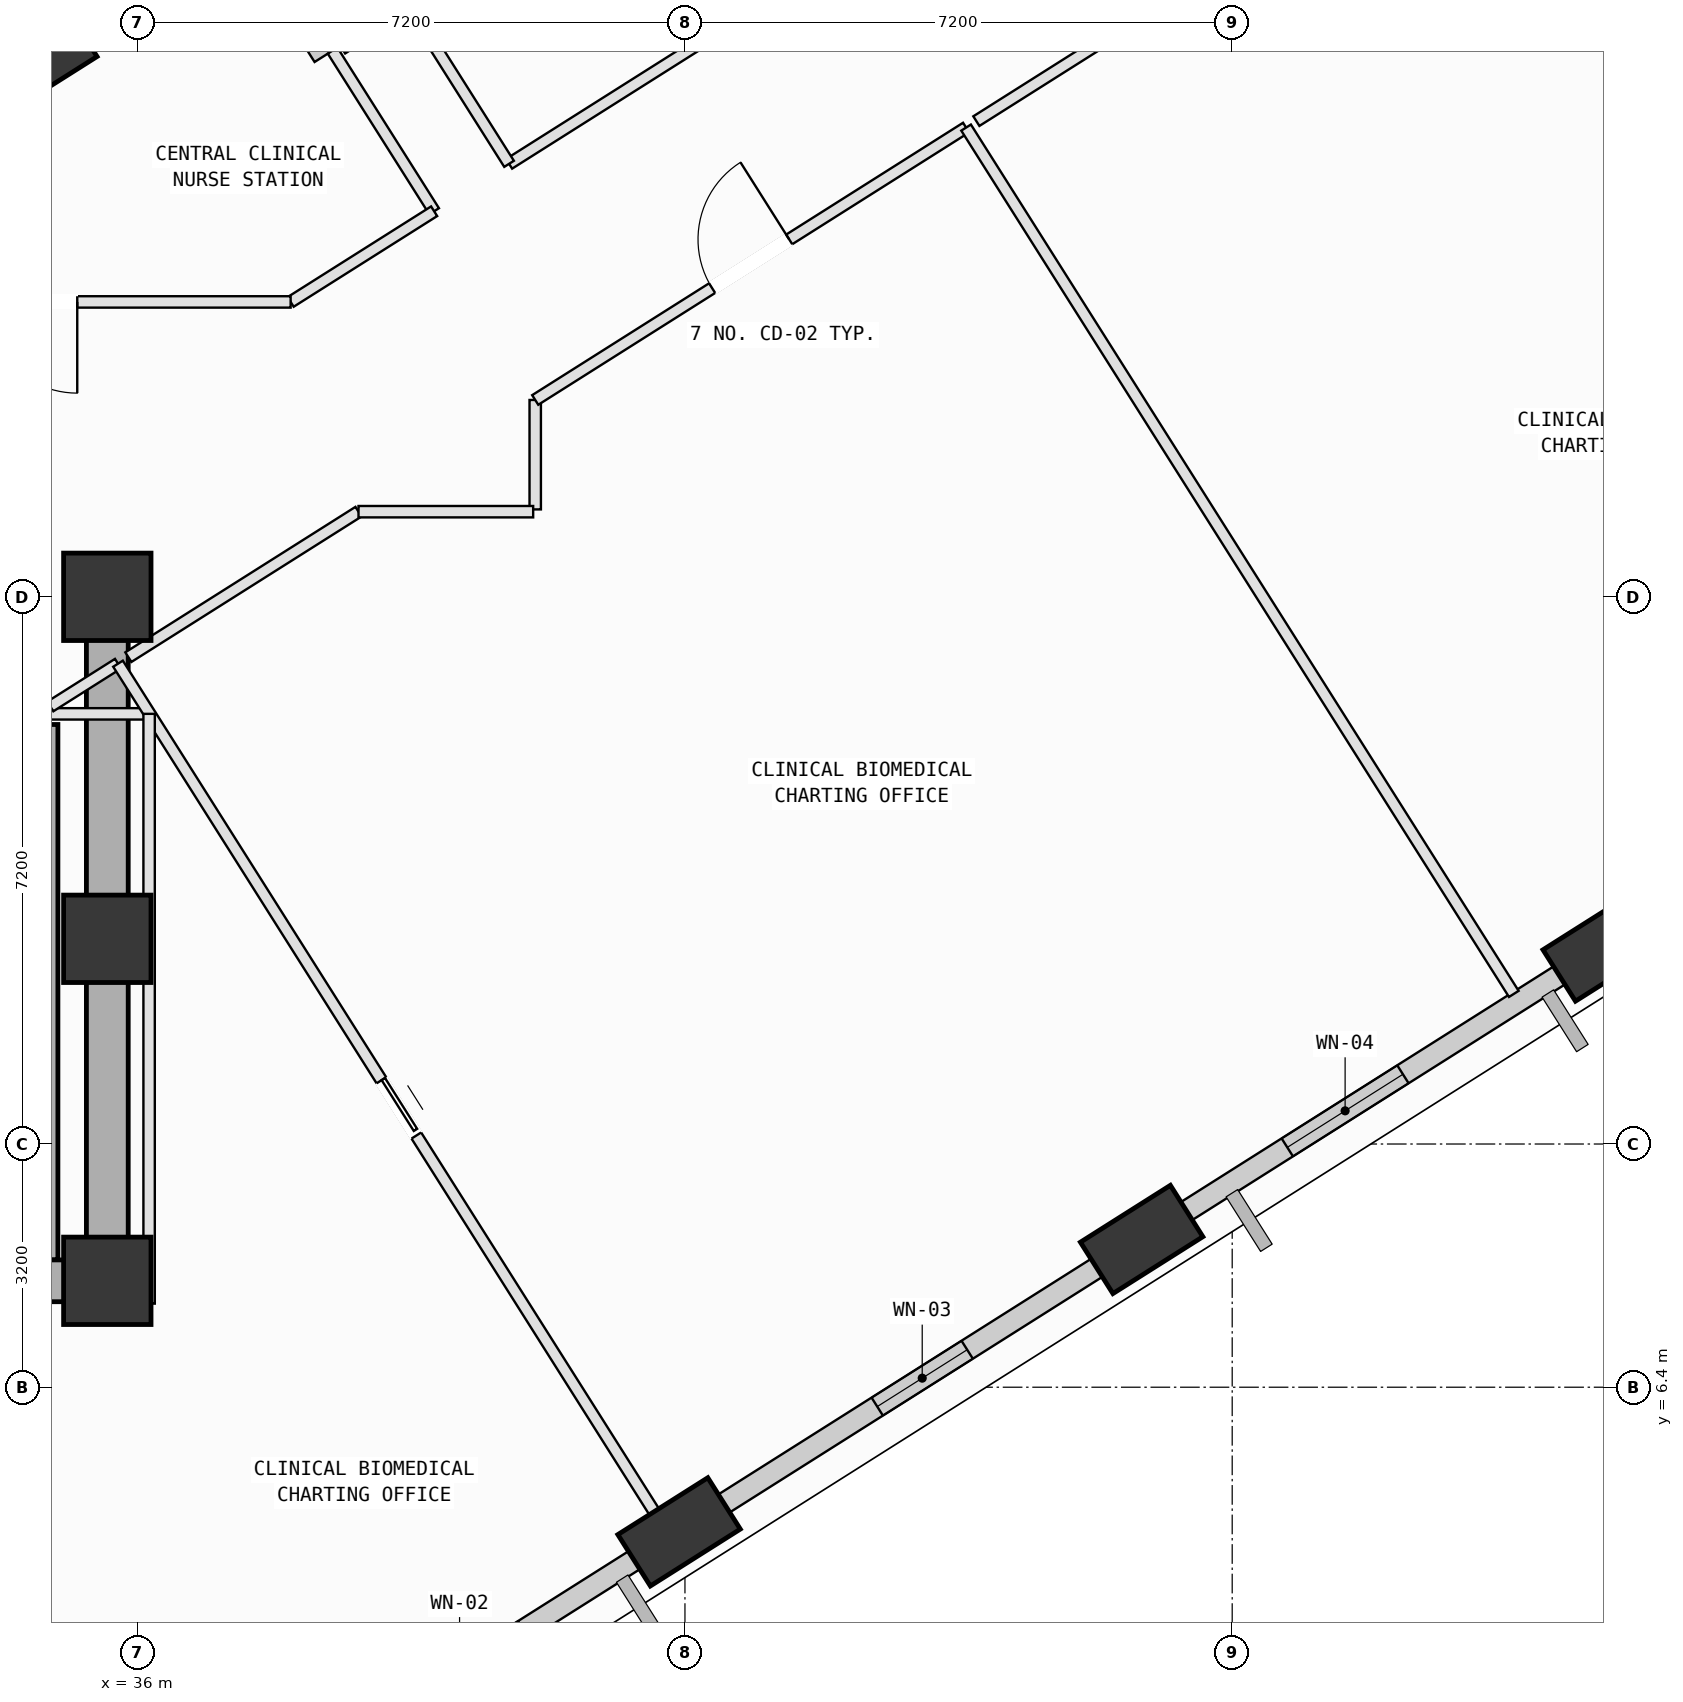
"""IFC4 building model, lengths in metres.
Left out: names, types, materials, properties, quantities, classifications, styles, units other than length and angle.
Written with IfcOpenShell. Run it as: python <this file> out.ifc"""

import sys

from ifc_helpers import new_model, si_unit, direction, frame, frame_2d, origin, origin_2d, place, context, subcontext, project, spatial, rectangle, extrude, element, fill, save


model = new_model("IFC4")
c1 = context("Model", 3, precision=1e-05, world=origin(), true_north=direction((0.0, 1.0)))
c2 = subcontext(c1, "Body", "Model", "MODEL_VIEW")
j1 = project(units=[si_unit("LENGTHUNIT", "METRE"), si_unit("PLANEANGLEUNIT", "RADIAN")], contexts=[c1])
p1 = place(None, origin())
s1 = spatial("IfcSite", under=j1, at=p1, CompositionType="ELEMENT")
p2 = place(p1, origin())
s2 = spatial("IfcBuilding", under=s1, at=p2, CompositionType="ELEMENT")
p3 = place(p2, frame((0.0, 0.0, 161.8)))
s3 = spatial("IfcBuildingStorey", under=s2, at=p3, CompositionType="ELEMENT", Elevation=161.8)
for number, where, z_axis, x_axis in (
    (1, (35.6, 7.8, 0.0), (0.0, 0.0, 1.0), (1.0, 0.0, 0.0)),
    (2, (35.6, 12.3, 0.0), (0.0, 0.0, 1.0), (1.0, 0.0, 0.0)),
    (3, (35.6, 16.8, 0.0), (0.0, 0.0, 1.0), (1.0, 0.0, 0.0)),
):
    element("IfcColumn", number, at=place(p3, frame(where, z_axis=z_axis, x_axis=x_axis)), inside=s3, PredefinedType="COLUMN", context=c2, shape_type="SweptSolid", body=[
        extrude(rectangle(XDim=1.15, YDim=1.15, at=origin_2d()), origin(), (0.0, 0.0, 1.0), 4.0),
    ])
p4 = place(p3, frame((43.123, 4.497, 0.002), z_axis=(0.083457366466, 0.039964642688, 0.995709644082), x_axis=(-0.844943215104, 0.532565627467, 0.049445077517)))
e4 = element("IfcColumn", 4, at=p4, inside=s3, PredefinedType="COLUMN", context=c2, shape_type="SweptSolid", body=[
    extrude(rectangle(XDim=1.4, YDim=0.8, at=origin_2d()), origin(), (0.0, 0.0, 1.0), 4.014),
])
p5 = place(p3, frame((49.208, 8.344, 0.002), z_axis=(0.067391750419, 0.064958835241, 0.995609713542), x_axis=(-0.969640103682, 0.239366736431, 0.050016345554)))
e5 = element("IfcColumn", 5, at=p5, inside=s3, PredefinedType="COLUMN", context=c2, shape_type="SweptSolid", body=[
    extrude(rectangle(XDim=1.4, YDim=0.8, at=origin_2d()), origin(), (0.0, 0.0, 1.0), 4.014),
])
p6 = place(p3, frame((55.294, 12.192, 0.002), z_axis=(0.051223513882, 0.089869011899, 0.994635467056), x_axis=(-0.997536992389, -0.04318182071, 0.055274579841)))
e6 = element("IfcColumn", 6, at=p6, inside=s3, PredefinedType="COLUMN", context=c2, shape_type="SweptSolid", body=[
    extrude(rectangle(XDim=1.4, YDim=0.8, at=origin_2d()), origin(), (0.0, 0.0, 1.0), 4.018),
])
p7 = place(p3, frame((34.659, 23.873, 0.002), z_axis=(0.003848671693, 0.004459571961, 0.999982649822), x_axis=(-0.989023621545, 0.147723958903, 0.003147696204)))
e7 = element("IfcColumn", 7, at=p7, inside=s3, PredefinedType="COLUMN", context=c2, shape_type="SweptSolid", body=[
    extrude(rectangle(XDim=1.4, YDim=0.8, at=origin_2d()), origin(), (0.0, 0.0, 1.0), 3.996),
])
p8 = place(p3, frame((38.665, 24.051, 0.0), z_axis=(0.0, 0.0, 1.0), x_axis=(0.84524375299, 0.534380948417, 0.0)))
e8 = element("IfcWall", 8, at=p8, inside=s3, PredefinedType="SOLIDWALL", context=c2, shape_type="SweptSolid", body=[
    extrude(rectangle(XDim=6.96, YDim=0.24, at=frame_2d((3.48, 0.0))), origin(), (0.0, 0.0, 1.0), 3.045),
])
p9 = place(p8, frame((2.263, 0.0, 0.0)))
e9 = element("IfcOpeningElement", 9, at=p9, cuts=e8, PredefinedType="OPENING", context=c2, shape_type="SweptSolid", body=[
    extrude(rectangle(XDim=1.1, YDim=2.15, at=frame_2d((0.55, 1.075))), frame((0.0, 0.13, 0.0), z_axis=(0.0, -1.0, 0.0), x_axis=(1.0, 0.0, 0.0)), (0.0, 0.0, 1.0), 0.26),
])
p10 = place(p3, frame((37.093, 26.014, 0.0), z_axis=(0.0, 0.0, 1.0), x_axis=(0.534345648323, -0.845266069423, 0.0)))
e10 = element("IfcWall", 10, at=p10, inside=s3, PredefinedType="SOLIDWALL", context=c2, shape_type="SweptSolid", body=[
    extrude(rectangle(XDim=2.5, YDim=0.24, at=frame_2d((1.25, 0.0))), origin(), (0.0, 0.0, 1.0), 3.165),
])
p11 = place(p3, frame((42.86, 4.331, 0.0), z_axis=(0.0, 0.0, 1.0), x_axis=(-0.845265708626, -0.534346219057, 0.0)))
e11 = element("IfcWall", 11, at=p11, inside=s3, PredefinedType="SOLIDWALL", context=c2, shape_type="SweptSolid", body=[
    extrude(rectangle(XDim=6.214, YDim=0.28, at=frame_2d((3.107, 0.0))), origin(), (0.0, 0.0, 1.0), 3.165),
])
p12 = place(p11, frame((2.106, 0.0, 0.75)))
e12 = element("IfcOpeningElement", 12, at=p12, cuts=e11, PredefinedType="OPENING", context=c2, shape_type="SweptSolid", body=[
    extrude(rectangle(XDim=2.0, YDim=1.95, at=frame_2d((1.0, 0.975))), frame((0.0, 0.15, 0.0), z_axis=(0.0, -1.0, 0.0), x_axis=(1.0, 0.0, 0.0)), (0.0, 0.0, 1.0), 0.3),
])
p13 = place(p3, frame((48.946, 8.178, 0.0), z_axis=(0.0, 0.0, 1.0), x_axis=(-0.845265511335, -0.534346531147, 0.0)))
e13 = element("IfcWall", 13, at=p13, inside=s3, PredefinedType="SOLIDWALL", context=c2, shape_type="SweptSolid", body=[
    extrude(rectangle(XDim=6.209, YDim=0.28, at=frame_2d((3.104, 0.0))), origin(), (0.0, 0.0, 1.0), 3.165),
])
p14 = place(p13, frame((2.405, 0.0, 0.75)))
e14 = element("IfcOpeningElement", 14, at=p14, cuts=e13, PredefinedType="OPENING", context=c2, shape_type="SweptSolid", body=[
    extrude(rectangle(XDim=1.4, YDim=1.85, at=frame_2d((0.7, 0.925))), frame((0.0, 0.15, 0.0), z_axis=(0.0, -1.0, 0.0), x_axis=(1.0, 0.0, 0.0)), (0.0, 0.0, 1.0), 0.3),
])
p15 = place(p3, frame((55.038, 12.03, 0.0), z_axis=(0.0, 0.0, 1.0), x_axis=(-0.845251842868, -0.53436815224, 0.0)))
e15 = element("IfcWall", 15, at=p15, inside=s3, PredefinedType="SOLIDWALL", context=c2, shape_type="SweptSolid", body=[
    extrude(rectangle(XDim=6.218, YDim=0.28, at=frame_2d((3.109, 0.0))), origin(), (0.0, 0.0, 1.0), 3.165),
])
p16 = place(p15, frame((2.83, 0.0, 0.75)))
e16 = element("IfcOpeningElement", 16, at=p16, cuts=e15, PredefinedType="OPENING", context=c2, shape_type="SweptSolid", body=[
    extrude(rectangle(XDim=1.8, YDim=2.05, at=frame_2d((0.9, 1.025))), frame((0.0, 0.15, 0.0), z_axis=(0.0, -1.0, 0.0), x_axis=(1.0, 0.0, 0.0)), (0.0, 0.0, 1.0), 0.3),
])
p17 = place(p3, frame((34.83, 15.12, 0.0), z_axis=(0.0, 0.0, 1.0), x_axis=(0.0, -1.0, 0.0)))
e17 = element("IfcWall", 17, at=p17, inside=s3, PredefinedType="SOLIDWALL", context=c2, shape_type="SweptSolid", body=[
    extrude(rectangle(XDim=7.045, YDim=0.24, at=frame_2d((3.522, 0.0))), origin(), (0.0, 0.0, 1.0), 3.78),
])
p18 = place(p3, frame((24.8, 7.8, 0.0), z_axis=(0.0, 0.0, 1.0), x_axis=(1.0, 0.0, 0.0)))
e18 = element("IfcWall", 18, at=p18, inside=s3, PredefinedType="SHEAR", context=c2, shape_type="SweptSolid", body=[
    extrude(rectangle(XDim=10.8, YDim=0.55, at=frame_2d((5.4, 0.0))), origin(), (0.0, 0.0, 1.0), 3.78),
])
p19 = place(p3, frame((35.6, 7.8, 0.0), z_axis=(0.0, 0.0, 1.0), x_axis=(0.0, 1.0, 0.0)))
e19 = element("IfcWall", 19, at=p19, inside=s3, PredefinedType="SHEAR", context=c2, shape_type="SweptSolid", body=[
    extrude(rectangle(XDim=9.0, YDim=0.55, at=frame_2d((4.5, 0.0))), origin(), (0.0, 0.0, 1.0), 3.78),
])
p20 = place(p3, frame((36.15, 15.26, 0.0), z_axis=(0.0, 0.0, 1.0), x_axis=(-1.0, 0.0, 0.0)))
e20 = element("IfcWall", 20, at=p20, inside=s3, PredefinedType="PARTITIONING", context=c2, shape_type="SweptSolid", body=[
    extrude(rectangle(XDim=1.3, YDim=0.15, at=frame_2d((0.65, 0.0))), origin(), (0.0, 0.0, 1.0), 3.78),
])
p21 = place(p3, frame((34.85, 15.357, 0.0), z_axis=(0.0, 0.0, 1.0), x_axis=(0.84534574495, 0.534219591081, 0.0)))
e21 = element("IfcWall", 21, at=p21, inside=s3, PredefinedType="PARTITIONING", context=c2, shape_type="SweptSolid", body=[
    extrude(rectangle(XDim=1.054, YDim=0.15, at=frame_2d((0.527, 0.0))), origin(), (0.0, 0.0, 1.0), 3.78),
])
p22 = place(p3, frame((35.741, 15.92, 0.0), z_axis=(0.0, 0.0, 1.0), x_axis=(0.534355579838, -0.845259791008, 0.0)))
e22 = element("IfcWall", 22, at=p22, inside=s3, PredefinedType="PARTITIONING", context=c2, shape_type="SweptSolid", body=[
    extrude(rectangle(XDim=13.83, YDim=0.15, at=frame_2d((6.915, 0.0))), origin(), (0.0, 0.0, 1.0), 3.78),
])
p23 = place(p22, frame((6.485, 0.0, 0.0)))
e23 = element("IfcOpeningElement", 23, at=p23, cuts=e22, PredefinedType="OPENING", context=c2, shape_type="SweptSolid", body=[
    extrude(rectangle(XDim=0.86, YDim=2.06, at=frame_2d((0.43, 1.03))), frame((0.0, 0.085, 0.0), z_axis=(0.0, -1.0, 0.0), x_axis=(1.0, 0.0, 0.0)), (0.0, 0.0, 1.0), 0.17),
])
p24 = place(p3, frame((35.6, 7.5, 0.0), z_axis=(0.0, 0.0, 1.0), x_axis=(1.0, 0.0, 0.0)))
e24 = element("IfcWall", 24, at=p24, inside=s3, PredefinedType="PARTITIONING", context=c2, shape_type="SweptSolid", body=[
    extrude(rectangle(XDim=0.55, YDim=0.15, at=frame_2d((0.275, 0.0))), origin(), (0.0, 0.0, 1.0), 3.065),
])
p25 = place(p3, frame((36.15, 7.5, 0.0), z_axis=(0.0, 0.0, 1.0), x_axis=(0.0, 1.0, 0.0)))
e25 = element("IfcWall", 25, at=p25, inside=s3, PredefinedType="PARTITIONING", context=c2, shape_type="SweptSolid", body=[
    extrude(rectangle(XDim=7.76, YDim=0.15, at=frame_2d((3.88, 0.0))), origin(), (0.0, 0.0, 1.0), 3.065),
])
p26 = place(p3, frame((41.23, 17.95, 0.0), z_axis=(0.0, 0.0, 1.0), x_axis=(0.0, 1.0, 0.0)))
e26 = element("IfcWall", 26, at=p26, inside=s3, PredefinedType="PARTITIONING", context=c2, shape_type="SweptSolid", body=[
    extrude(rectangle(XDim=1.44, YDim=0.15, at=frame_2d((0.72, 0.0))), origin(), (0.0, 0.0, 1.0), 3.78),
])
p27 = place(p3, frame((41.23, 19.39, 0.0), z_axis=(0.0, 0.0, 1.0), x_axis=(0.845230176883, 0.534402421482, 0.0)))
e27 = element("IfcWall", 27, at=p27, inside=s3, PredefinedType="PARTITIONING", context=c2, shape_type="SweptSolid", body=[
    extrude(rectangle(XDim=6.707, YDim=0.15, at=frame_2d((3.354, 0.0))), origin(), (0.0, 0.0, 1.0), 3.065),
])
p28 = place(p27, frame((2.753, 0.0, 0.0)))
e28 = element("IfcOpeningElement", 28, at=p28, cuts=e27, PredefinedType="OPENING", context=c2, shape_type="SweptSolid", body=[
    extrude(rectangle(XDim=1.2, YDim=2.15, at=frame_2d((0.6, 1.075))), frame((0.0, 0.085, 0.0), z_axis=(0.0, -1.0, 0.0), x_axis=(1.0, 0.0, 0.0)), (0.0, 0.0, 1.0), 0.17),
])
p29 = place(p3, frame((46.899, 22.974, 0.0), z_axis=(0.0, 0.0, 1.0), x_axis=(0.534341679517, -0.845268578341, 0.0)))
e29 = element("IfcWall", 29, at=p29, inside=s3, PredefinedType="PARTITIONING", context=c2, shape_type="SweptSolid", body=[
    extrude(rectangle(XDim=13.486, YDim=0.15, at=frame_2d((6.743, 0.0))), origin(), (0.0, 0.0, 1.0), 3.415),
])
p30 = place(p3, frame((49.905, 8.513, 0.0), z_axis=(0.0, 0.0, 1.0), x_axis=(-0.844990078889, -0.534781980418, 0.0)))
e30 = element("IfcWall", 30, at=p30, inside=s3, PredefinedType="PARTITIONING", context=c2, shape_type="SweptSolid", body=[
    extrude(rectangle(XDim=0.989, YDim=0.15, at=frame_2d((0.495, 0.0))), origin(), (0.0, 0.0, 1.0), 3.165),
])
p31 = place(p3, frame((43.821, 4.666, 0.0), z_axis=(0.0, 0.0, 1.0), x_axis=(-0.845329514709, -0.534245272849, 0.0)))
e31 = element("IfcWall", 31, at=p31, inside=s3, PredefinedType="PARTITIONING", context=c2, shape_type="SweptSolid", body=[
    extrude(rectangle(XDim=0.655, YDim=0.15, at=frame_2d((0.328, 0.0))), origin(), (0.0, 0.0, 1.0), 3.165),
])
p32 = place(p3, frame((35.877, 16.006, 0.0), z_axis=(0.0, 0.0, 1.0), x_axis=(0.845318811602, 0.534262207865, 0.0)))
e32 = element("IfcWall", 32, at=p32, inside=s3, PredefinedType="PARTITIONING", context=c2, shape_type="SweptSolid", body=[
    extrude(rectangle(XDim=3.582, YDim=0.15, at=frame_2d((1.791, 0.0))), origin(), (0.0, 0.0, 1.0), 3.065),
])
p33 = place(p3, frame((38.905, 17.92, 0.0), z_axis=(0.0, 0.0, 1.0), x_axis=(1.0, 0.0, 0.0)))
e33 = element("IfcWall", 33, at=p33, inside=s3, PredefinedType="PARTITIONING", context=c2, shape_type="SweptSolid", body=[
    extrude(rectangle(XDim=2.298, YDim=0.15, at=frame_2d((1.149, 0.0))), origin(), (0.0, 0.0, 1.0), 3.78),
])
p34 = place(p3, frame((47.034, 23.059, 0.0), z_axis=(0.0, 0.0, 1.0), x_axis=(0.845254384561, 0.534364131825, 0.0)))
e34 = element("IfcWall", 34, at=p34, inside=s3, PredefinedType="PARTITIONING", context=c2, shape_type="SweptSolid", body=[
    extrude(rectangle(XDim=10.641, YDim=0.15, at=frame_2d((5.32, 0.0))), origin(), (0.0, 0.0, 1.0), 3.78),
])
p35 = place(p34, frame((4.72, 0.0, 0.0)))
e35 = element("IfcOpeningElement", 35, at=p35, cuts=e34, PredefinedType="OPENING", context=c2, shape_type="SweptSolid", body=[
    extrude(rectangle(XDim=1.2, YDim=2.15, at=frame_2d((0.6, 1.075))), frame((0.0, 0.085, 0.0), z_axis=(0.0, -1.0, 0.0), x_axis=(1.0, 0.0, 0.0)), (0.0, 0.0, 1.0), 0.17),
])
p36 = place(p3, frame((55.984, 12.355, 0.0), z_axis=(0.0, 0.0, 1.0), x_axis=(-0.845381621372, -0.534162816233, 0.0)))
e36 = element("IfcWall", 36, at=p36, inside=s3, PredefinedType="PARTITIONING", context=c2, shape_type="SweptSolid", body=[
    extrude(rectangle(XDim=0.974, YDim=0.15, at=frame_2d((0.487, 0.0))), origin(), (0.0, 0.0, 1.0), 3.165),
])
p37 = place(p3, frame((28.956, 20.918, 0.0), z_axis=(0.0, 0.0, 1.0), x_axis=(0.845335214323, 0.534236254316, 0.0)))
e37 = element("IfcWall", 37, at=p37, inside=s3, PredefinedType="PARTITIONING", context=c2, shape_type="SweptSolid", body=[
    extrude(rectangle(XDim=9.515, YDim=0.15, at=frame_2d((4.757, 0.0))), origin(), (0.0, 0.0, 1.0), 3.78),
])
p38 = place(p3, frame((38.564, 23.987, 0.0), z_axis=(0.0, 0.0, 1.0), x_axis=(0.534213358296, -0.845349683751, 0.0)))
e38 = element("IfcWall", 38, at=p38, inside=s3, PredefinedType="PARTITIONING", context=c2, shape_type="SweptSolid", body=[
    extrude(rectangle(XDim=2.501, YDim=0.15, at=frame_2d((1.25, 0.0))), origin(), (0.0, 0.0, 1.0), 3.78),
])
p39 = place(p3, frame((39.9, 21.873, 0.0), z_axis=(0.0, 0.0, 1.0), x_axis=(-0.845340806847, -0.534227405025, 0.0)))
e39 = element("IfcWall", 39, at=p39, inside=s3, PredefinedType="PARTITIONING", context=c2, shape_type="SweptSolid", body=[
    extrude(rectangle(XDim=2.233, YDim=0.15, at=frame_2d((1.117, 0.0))), origin(), (0.0, 0.0, 1.0), 3.045),
])
p40 = place(p3, frame((38.012, 20.68, 0.0), z_axis=(0.0, 0.0, 1.0), x_axis=(-1.0, 0.0, 0.0)))
e40 = element("IfcWall", 40, at=p40, inside=s3, PredefinedType="PARTITIONING", context=c2, shape_type="SweptSolid", body=[
    extrude(rectangle(XDim=6.815, YDim=0.15, at=frame_2d((3.407, 0.0))), origin(), (0.0, 0.0, 1.0), 3.415),
])
p41 = place(p40, frame((2.808, 0.0, 0.0)))
e41 = element("IfcOpeningElement", 41, at=p41, cuts=e40, PredefinedType="OPENING", context=c2, shape_type="SweptSolid", body=[
    extrude(rectangle(XDim=1.2, YDim=2.15, at=frame_2d((0.6, 1.075))), frame((0.0, 0.085, 0.0), z_axis=(0.0, -1.0, 0.0), x_axis=(1.0, 0.0, 0.0)), (0.0, 0.0, 1.0), 0.17),
])
p42 = place(p3, frame((50.039, 28.283, 0.0), z_axis=(0.0, 0.0, 1.0), x_axis=(-0.845280431179, -0.534322929197, 0.0)))
e42 = element("IfcWall", 42, at=p42, inside=s3, PredefinedType="PARTITIONING", context=c2, shape_type="SweptSolid", body=[
    extrude(rectangle(XDim=10.828, YDim=0.15, at=frame_2d((5.414, 0.0))), origin(), (0.0, 0.0, 1.0), 3.78),
])
p43 = place(p42, frame((4.814, 0.0, 0.0)))
e43 = element("IfcOpeningElement", 43, at=p43, cuts=e42, PredefinedType="OPENING", context=c2, shape_type="SweptSolid", body=[
    extrude(rectangle(XDim=1.2, YDim=2.15, at=frame_2d((0.6, 1.075))), frame((0.0, 0.085, 0.0), z_axis=(0.0, -1.0, 0.0), x_axis=(1.0, 0.0, 0.0)), (0.0, 0.0, 1.0), 0.17),
])
p44 = place(p3, frame((40.886, 22.497, 0.0), z_axis=(0.0, 0.0, 1.0), x_axis=(-0.534271775948, 0.845312764263, 0.0)))
e44 = element("IfcWall", 44, at=p44, inside=s3, PredefinedType="PARTITIONING", context=c2, shape_type="SweptSolid", body=[
    extrude(rectangle(XDim=2.405, YDim=0.15, at=frame_2d((1.203, 0.0))), origin(), (0.0, 0.0, 1.0), 3.78),
])
p45 = place(p14, origin())
e45 = element("IfcWindow", 45, at=p45, inside=s3, PartitioningType="SINGLE_PANEL", PredefinedType="WINDOW", context=c2, shape_type="SweptSolid", body=[
    extrude(rectangle(XDim=1.4, YDim=1.85, at=frame_2d((0.7, 0.925))), frame((0.0, 0.03, 0.0), z_axis=(0.0, -1.0, 0.0), x_axis=(1.0, 0.0, 0.0)), (0.0, 0.0, 1.0), 0.06),
])
fill(e14, e45)
p46 = place(p16, origin())
e46 = element("IfcWindow", 46, at=p46, inside=s3, PartitioningType="SINGLE_PANEL", PredefinedType="WINDOW", context=c2, shape_type="SweptSolid", body=[
    extrude(rectangle(XDim=1.8, YDim=2.05, at=frame_2d((0.9, 1.025))), frame((0.0, 0.03, 0.0), z_axis=(0.0, -1.0, 0.0), x_axis=(1.0, 0.0, 0.0)), (0.0, 0.0, 1.0), 0.06),
])
fill(e16, e46)
p47 = place(p28, origin())
e47 = element("IfcDoor", 47, at=p47, inside=s3, OperationType="SINGLE_SWING_RIGHT", PredefinedType="DOOR", context=c2, shape_type="SweptSolid", body=[
    extrude(rectangle(XDim=1.2, YDim=2.15, at=frame_2d((0.6, 1.075))), frame((0.0, 0.025, 0.0), z_axis=(0.0, -1.0, 0.0), x_axis=(1.0, 0.0, 0.0)), (0.0, 0.0, 1.0), 0.05),
])
fill(e28, e47)
p48 = place(p41, origin())
e48 = element("IfcDoor", 48, at=p48, inside=s3, OperationType="SINGLE_SWING_LEFT", PredefinedType="DOOR", context=c2, shape_type="SweptSolid", body=[
    extrude(rectangle(XDim=1.2, YDim=2.15, at=frame_2d((0.6, 1.075))), frame((0.0, 0.025, 0.0), z_axis=(0.0, -1.0, 0.0), x_axis=(1.0, 0.0, 0.0)), (0.0, 0.0, 1.0), 0.05),
])
fill(e41, e48)
p49 = place(p23, origin())
e49 = element("IfcDoor", 49, at=p49, inside=s3, OperationType="SLIDING_TO_LEFT", PredefinedType="DOOR", context=c2, shape_type="SweptSolid", body=[
    extrude(rectangle(XDim=0.86, YDim=2.06, at=frame_2d((0.43, 1.03))), frame((0.0, 0.025, 0.0), z_axis=(0.0, -1.0, 0.0), x_axis=(1.0, 0.0, 0.0)), (0.0, 0.0, 1.0), 0.05),
])
fill(e23, e49)
save(model, sys.argv[1])
